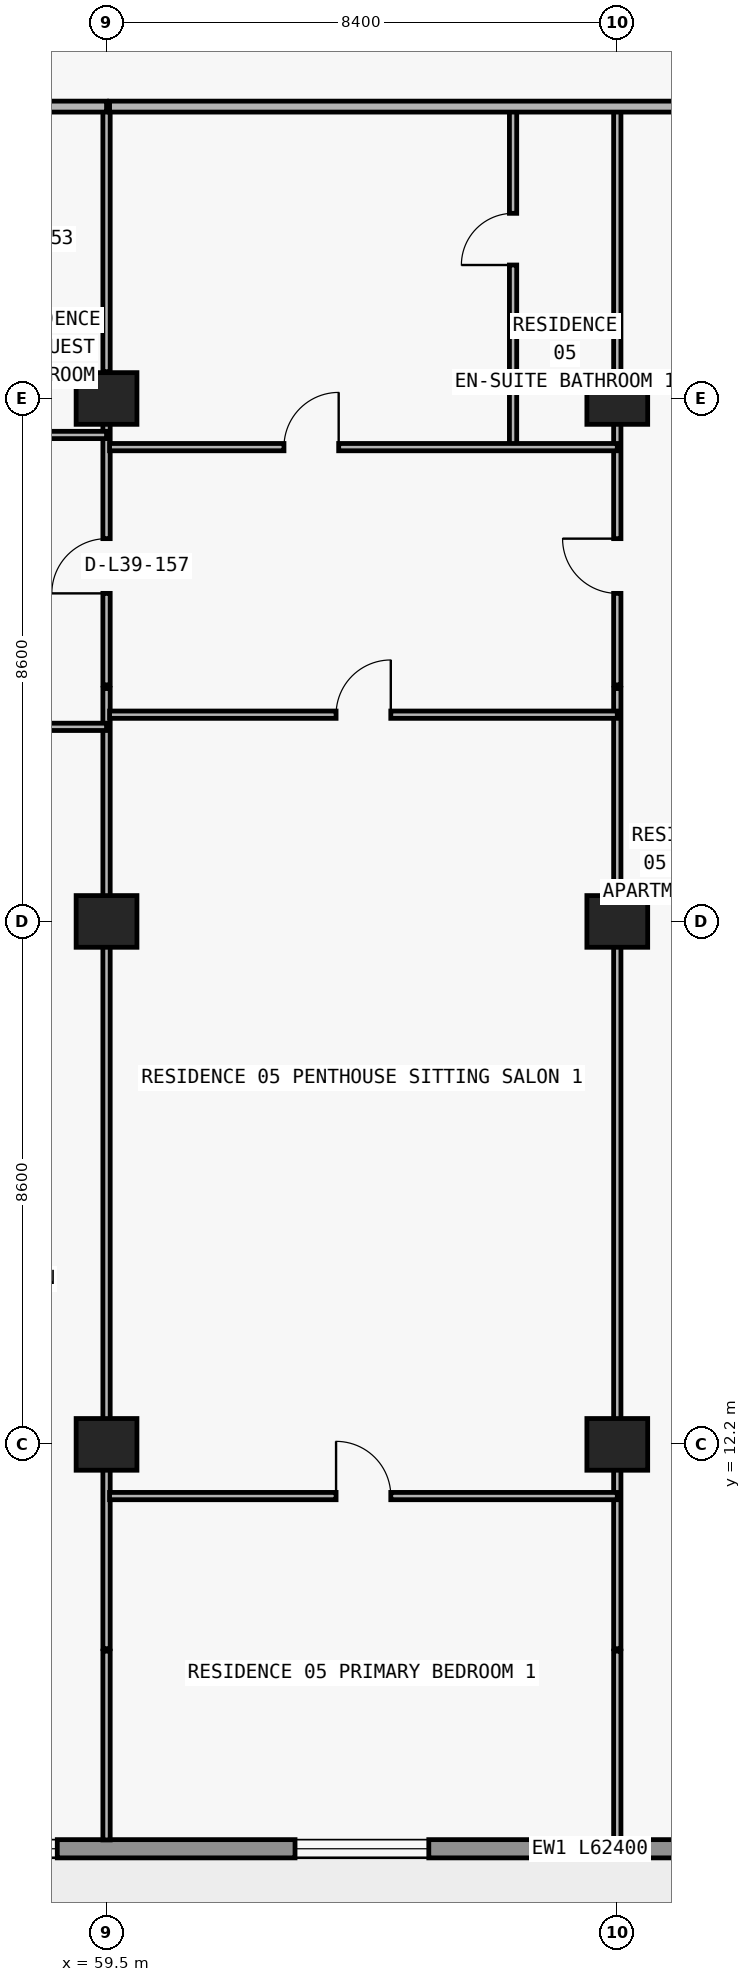
"""IFC4 building model, lengths in metres.
Left out: names, types, materials, properties, quantities, classifications, styles, units other than length and angle.
Written with IfcOpenShell. Run it as: python <this file> out.ifc"""

import sys

from ifc_helpers import new_model, si_unit, direction, frame, frame_2d, origin, origin_2d, place, context, subcontext, project, spatial, rectangle, extrude, element, fill, save


model = new_model("IFC4")
c1 = context("Model", 3, precision=1e-05, world=origin(), true_north=direction((0.0, 1.0)))
c2 = subcontext(c1, "Body", "Model", "MODEL_VIEW")
j1 = project(units=[si_unit("LENGTHUNIT", "METRE"), si_unit("PLANEANGLEUNIT", "RADIAN")], contexts=[c1])
p1 = place(None, origin())
s1 = spatial("IfcSite", under=j1, at=p1, CompositionType="ELEMENT")
p2 = place(p1, origin())
s2 = spatial("IfcBuilding", under=s1, at=p2, CompositionType="ELEMENT")
p3 = place(p2, frame((0.0, 0.0, 142.2)))
s3 = spatial("IfcBuildingStorey", under=s2, at=p3, CompositionType="ELEMENT", Elevation=142.2)
for number, where, z_axis, x_axis in (
    (1, (59.5, 12.2, 0.0), (0.0, 0.0, 1.0), (1.0, 0.0, 0.0)),
    (2, (67.9, 12.2, 0.0), (0.0, 0.0, 1.0), (1.0, 0.0, 0.0)),
    (3, (59.5, 20.8, 0.0), (0.0, 0.0, 1.0), (1.0, 0.0, 0.0)),
    (4, (67.9, 20.8, 0.0), (0.0, 0.0, 1.0), (1.0, 0.0, 0.0)),
    (5, (59.5, 29.4, 0.0), (0.0, 0.0, 1.0), (1.0, 0.0, 0.0)),
    (6, (67.9, 29.4, 0.0), (0.0, 0.0, 1.0), (1.0, 0.0, 0.0)),
):
    element("IfcColumn", number, at=place(p3, frame(where, z_axis=z_axis, x_axis=x_axis)), inside=s3, PredefinedType="COLUMN", context=c2, shape_type="SweptSolid", body=[
        extrude(rectangle(XDim=1.0, YDim=0.85, at=origin_2d()), origin(), (0.0, 0.0, 1.0), 3.05),
    ])
p4 = place(p3, frame((70.1, 5.55, 0.0), z_axis=(0.0, 0.0, 1.0), x_axis=(-1.0, 0.0, 0.0)))
e7 = element("IfcWall", 7, at=p4, inside=s3, PredefinedType="STANDARD", context=c2, shape_type="SweptSolid", body=[
    extrude(rectangle(XDim=62.4, YDim=0.3, at=frame_2d((31.2, 0.0))), origin(), (0.0, 0.0, 1.0), 3.05),
])
p5 = place(p4, frame((57.226, 0.0, 0.0)))
e8 = element("IfcOpeningElement", 8, at=p5, cuts=e7, PredefinedType="OPENING", context=c2, shape_type="SweptSolid", body=[
    extrude(rectangle(XDim=2.0, YDim=2.3, at=frame_2d((1.0, 1.15))), frame((0.0, 0.16, 0.0), z_axis=(0.0, -1.0, 0.0), x_axis=(1.0, 0.0, 0.0)), (0.0, 0.0, 1.0), 0.32),
])
p6 = place(p4, frame((52.926, 0.0, 0.85)))
e9 = element("IfcOpeningElement", 9, at=p6, cuts=e7, PredefinedType="OPENING", context=c2, shape_type="SweptSolid", body=[
    extrude(rectangle(XDim=2.2, YDim=1.55, at=frame_2d((1.1, 0.775))), frame((0.0, 0.16, 0.0), z_axis=(0.0, -1.0, 0.0), x_axis=(1.0, 0.0, 0.0)), (0.0, 0.0, 1.0), 0.32),
])
p7 = place(p4, frame((48.49, 0.0, 0.0)))
e10 = element("IfcOpeningElement", 10, at=p7, cuts=e7, PredefinedType="OPENING", context=c2, shape_type="SweptSolid", body=[
    extrude(rectangle(XDim=2.0, YDim=2.3, at=frame_2d((1.0, 1.15))), frame((0.0, 0.16, 0.0), z_axis=(0.0, -1.0, 0.0), x_axis=(1.0, 0.0, 0.0)), (0.0, 0.0, 1.0), 0.32),
])
p8 = place(p4, frame((44.39, 0.0, 0.85)))
e11 = element("IfcOpeningElement", 11, at=p8, cuts=e7, PredefinedType="OPENING", context=c2, shape_type="SweptSolid", body=[
    extrude(rectangle(XDim=1.8, YDim=1.55, at=frame_2d((0.9, 0.775))), frame((0.0, 0.16, 0.0), z_axis=(0.0, -1.0, 0.0), x_axis=(1.0, 0.0, 0.0)), (0.0, 0.0, 1.0), 0.32),
])
p9 = place(p4, frame((40.426, 0.0, 0.0)))
e12 = element("IfcOpeningElement", 12, at=p9, cuts=e7, PredefinedType="OPENING", context=c2, shape_type="SweptSolid", body=[
    extrude(rectangle(XDim=2.0, YDim=2.3, at=frame_2d((1.0, 1.15))), frame((0.0, 0.16, 0.0), z_axis=(0.0, -1.0, 0.0), x_axis=(1.0, 0.0, 0.0)), (0.0, 0.0, 1.0), 0.32),
])
p10 = place(p4, frame((36.126, 0.0, 0.85)))
e13 = element("IfcOpeningElement", 13, at=p10, cuts=e7, PredefinedType="OPENING", context=c2, shape_type="SweptSolid", body=[
    extrude(rectangle(XDim=2.2, YDim=1.55, at=frame_2d((1.1, 0.775))), frame((0.0, 0.16, 0.0), z_axis=(0.0, -1.0, 0.0), x_axis=(1.0, 0.0, 0.0)), (0.0, 0.0, 1.0), 0.32),
])
p11 = place(p4, frame((32.09, 0.0, 0.0)))
e14 = element("IfcOpeningElement", 14, at=p11, cuts=e7, PredefinedType="OPENING", context=c2, shape_type="SweptSolid", body=[
    extrude(rectangle(XDim=2.0, YDim=2.3, at=frame_2d((1.0, 1.15))), frame((0.0, 0.16, 0.0), z_axis=(0.0, -1.0, 0.0), x_axis=(1.0, 0.0, 0.0)), (0.0, 0.0, 1.0), 0.32),
])
p12 = place(p4, frame((28.21, 0.0, 0.65)))
e15 = element("IfcOpeningElement", 15, at=p12, cuts=e7, PredefinedType="OPENING", context=c2, shape_type="SweptSolid", body=[
    extrude(rectangle(XDim=2.6, YDim=1.85, at=frame_2d((1.3, 0.925))), frame((0.0, 0.16, 0.0), z_axis=(0.0, -1.0, 0.0), x_axis=(1.0, 0.0, 0.0)), (0.0, 0.0, 1.0), 0.32),
])
p13 = place(p4, frame((22.1, 0.0, 0.85)))
e16 = element("IfcOpeningElement", 16, at=p13, cuts=e7, PredefinedType="OPENING", context=c2, shape_type="SweptSolid", body=[
    extrude(rectangle(XDim=2.2, YDim=1.55, at=frame_2d((1.1, 0.775))), frame((0.0, 0.16, 0.0), z_axis=(0.0, -1.0, 0.0), x_axis=(1.0, 0.0, 0.0)), (0.0, 0.0, 1.0), 0.32),
])
p14 = place(p4, frame((16.09, 0.0, 0.0)))
e17 = element("IfcOpeningElement", 17, at=p14, cuts=e7, PredefinedType="OPENING", context=c2, shape_type="SweptSolid", body=[
    extrude(rectangle(XDim=2.0, YDim=2.3, at=frame_2d((1.0, 1.15))), frame((0.0, 0.16, 0.0), z_axis=(0.0, -1.0, 0.0), x_axis=(1.0, 0.0, 0.0)), (0.0, 0.0, 1.0), 0.32),
])
p15 = place(p4, frame((11.41, 0.0, 0.65)))
e18 = element("IfcOpeningElement", 18, at=p15, cuts=e7, PredefinedType="OPENING", context=c2, shape_type="SweptSolid", body=[
    extrude(rectangle(XDim=2.6, YDim=1.85, at=frame_2d((1.3, 0.925))), frame((0.0, 0.16, 0.0), z_axis=(0.0, -1.0, 0.0), x_axis=(1.0, 0.0, 0.0)), (0.0, 0.0, 1.0), 0.32),
])
p16 = place(p4, frame((5.3, 0.0, 0.85)))
e19 = element("IfcOpeningElement", 19, at=p16, cuts=e7, PredefinedType="OPENING", context=c2, shape_type="SweptSolid", body=[
    extrude(rectangle(XDim=2.2, YDim=1.55, at=frame_2d((1.1, 0.775))), frame((0.0, 0.16, 0.0), z_axis=(0.0, -1.0, 0.0), x_axis=(1.0, 0.0, 0.0)), (0.0, 0.0, 1.0), 0.32),
])
p17 = place(p3, frame((59.5, 5.695, 0.0), z_axis=(0.0, 0.0, 1.0), x_axis=(0.0, 1.0, 0.0)))
e20 = element("IfcWall", 20, at=p17, inside=s3, PredefinedType="PARTITIONING", context=c2, shape_type="SweptSolid", body=[
    extrude(rectangle(XDim=3.105, YDim=0.12, at=frame_2d((1.552, 0.0))), origin(), (0.0, 0.0, 1.0), 3.05),
])
p18 = place(p3, frame((59.5, 8.84, 0.0), z_axis=(0.0, 0.0, 1.0), x_axis=(0.0, 1.0, 0.0)))
e21 = element("IfcWall", 21, at=p18, inside=s3, PredefinedType="PARTITIONING", context=c2, shape_type="SweptSolid", body=[
    extrude(rectangle(XDim=15.79, YDim=0.12, at=frame_2d((7.895, 0.0))), origin(), (0.0, 0.0, 1.0), 2.174),
])
p19 = place(p3, frame((59.5, 24.69, 0.0), z_axis=(0.0, 0.0, 1.0), x_axis=(0.0, 1.0, 0.0)))
e22 = element("IfcWall", 22, at=p19, inside=s3, PredefinedType="PARTITIONING", context=c2, shape_type="SweptSolid", body=[
    extrude(rectangle(XDim=5.09, YDim=0.12, at=frame_2d((2.545, 0.0))), origin(), (0.0, 0.0, 1.0), 2.174),
])
p20 = place(p19, frame((1.505, 0.0, 0.0)))
e23 = element("IfcOpeningElement", 23, at=p20, cuts=e22, PredefinedType="OPENING", context=c2, shape_type="SweptSolid", body=[
    extrude(rectangle(XDim=0.9, YDim=2.124, at=frame_2d((0.45, 1.062))), frame((0.0, 0.07, 0.0), z_axis=(0.0, -1.0, 0.0), x_axis=(1.0, 0.0, 0.0)), (0.0, 0.0, 1.0), 0.14),
])
p21 = place(p3, frame((59.5, 29.84, 0.0), z_axis=(0.0, 0.0, 1.0), x_axis=(0.0, 1.0, 0.0)))
e24 = element("IfcWall", 24, at=p21, inside=s3, PredefinedType="PARTITIONING", context=c2, shape_type="SweptSolid", body=[
    extrude(rectangle(XDim=4.36, YDim=0.12, at=frame_2d((2.18, 0.0))), origin(), (0.0, 0.0, 1.0), 2.174),
])
p22 = place(p3, frame((66.186, 28.6, 0.0), z_axis=(0.0, 0.0, 1.0), x_axis=(0.0, 1.0, 0.0)))
e25 = element("IfcWall", 25, at=p22, inside=s3, PredefinedType="PARTITIONING", context=c2, shape_type="SweptSolid", body=[
    extrude(rectangle(XDim=1.18, YDim=0.12, at=frame_2d((0.59, 0.0))), origin(), (0.0, 0.0, 1.0), 3.05),
])
p23 = place(p3, frame((66.186, 29.84, 0.0), z_axis=(0.0, 0.0, 1.0), x_axis=(0.0, 1.0, 0.0)))
e26 = element("IfcWall", 26, at=p23, inside=s3, PredefinedType="PARTITIONING", context=c2, shape_type="SweptSolid", body=[
    extrude(rectangle(XDim=4.36, YDim=0.12, at=frame_2d((2.18, 0.0))), origin(), (0.0, 0.0, 1.0), 3.05),
])
p24 = place(p23, frame((1.755, 0.0, 0.0)))
e27 = element("IfcOpeningElement", 27, at=p24, cuts=e26, PredefinedType="OPENING", context=c2, shape_type="SweptSolid", body=[
    extrude(rectangle(XDim=0.85, YDim=2.1, at=frame_2d((0.425, 1.05))), frame((0.0, 0.07, 0.0), z_axis=(0.0, -1.0, 0.0), x_axis=(1.0, 0.0, 0.0)), (0.0, 0.0, 1.0), 0.14),
])
p25 = place(p3, frame((67.9, 5.695, 0.0), z_axis=(0.0, 0.0, 1.0), x_axis=(0.0, 1.0, 0.0)))
e28 = element("IfcWall", 28, at=p25, inside=s3, PredefinedType="PARTITIONING", context=c2, shape_type="SweptSolid", body=[
    extrude(rectangle(XDim=3.105, YDim=0.12, at=frame_2d((1.552, 0.0))), origin(), (0.0, 0.0, 1.0), 3.05),
])
p26 = place(p3, frame((67.9, 8.84, 0.0), z_axis=(0.0, 0.0, 1.0), x_axis=(0.0, 1.0, 0.0)))
e29 = element("IfcWall", 29, at=p26, inside=s3, PredefinedType="PARTITIONING", context=c2, shape_type="SweptSolid", body=[
    extrude(rectangle(XDim=15.79, YDim=0.12, at=frame_2d((7.895, 0.0))), origin(), (0.0, 0.0, 1.0), 2.174),
])
p27 = place(p3, frame((67.9, 24.69, 0.0), z_axis=(0.0, 0.0, 1.0), x_axis=(0.0, 1.0, 0.0)))
e30 = element("IfcWall", 30, at=p27, inside=s3, PredefinedType="PARTITIONING", context=c2, shape_type="SweptSolid", body=[
    extrude(rectangle(XDim=5.09, YDim=0.12, at=frame_2d((2.545, 0.0))), origin(), (0.0, 0.0, 1.0), 2.174),
])
p28 = place(p27, frame((1.505, 0.0, 0.0)))
e31 = element("IfcOpeningElement", 31, at=p28, cuts=e30, PredefinedType="OPENING", context=c2, shape_type="SweptSolid", body=[
    extrude(rectangle(XDim=0.9, YDim=2.124, at=frame_2d((0.45, 1.062))), frame((0.0, 0.07, 0.0), z_axis=(0.0, -1.0, 0.0), x_axis=(1.0, 0.0, 0.0)), (0.0, 0.0, 1.0), 0.14),
])
p29 = place(p3, frame((67.9, 29.84, 0.0), z_axis=(0.0, 0.0, 1.0), x_axis=(0.0, 1.0, 0.0)))
e32 = element("IfcWall", 32, at=p29, inside=s3, PredefinedType="PARTITIONING", context=c2, shape_type="SweptSolid", body=[
    extrude(rectangle(XDim=4.36, YDim=0.12, at=frame_2d((2.18, 0.0))), origin(), (0.0, 0.0, 1.0), 2.174),
])
p30 = place(p3, frame((59.55, 11.35, 0.0), z_axis=(0.0, 0.0, 1.0), x_axis=(1.0, 0.0, 0.0)))
e33 = element("IfcWall", 33, at=p30, inside=s3, PredefinedType="PARTITIONING", context=c2, shape_type="SweptSolid", body=[
    extrude(rectangle(XDim=8.35, YDim=0.12, at=frame_2d((4.175, 0.0))), origin(), (0.0, 0.0, 1.0), 3.05),
])
p31 = place(p30, frame((3.725, 0.0, 0.0)))
e34 = element("IfcOpeningElement", 34, at=p31, cuts=e33, PredefinedType="OPENING", context=c2, shape_type="SweptSolid", body=[
    extrude(rectangle(XDim=0.9, YDim=2.15, at=frame_2d((0.45, 1.075))), frame((0.0, 0.07, 0.0), z_axis=(0.0, -1.0, 0.0), x_axis=(1.0, 0.0, 0.0)), (0.0, 0.0, 1.0), 0.14),
])
p32 = place(p3, frame((51.32, 24.0, 0.0), z_axis=(0.0, 0.0, 1.0), x_axis=(1.0, 0.0, 0.0)))
e35 = element("IfcWall", 35, at=p32, inside=s3, PredefinedType="PARTITIONING", context=c2, shape_type="SweptSolid", body=[
    extrude(rectangle(XDim=8.18, YDim=0.12, at=frame_2d((4.09, 0.0))), origin(), (0.0, 0.0, 1.0), 3.05),
])
p33 = place(p32, frame((1.33, 0.0, 0.0)))
e36 = element("IfcOpeningElement", 36, at=p33, cuts=e35, PredefinedType="OPENING", context=c2, shape_type="SweptSolid", body=[
    extrude(rectangle(XDim=0.9, YDim=2.15, at=frame_2d((0.45, 1.075))), frame((0.0, 0.07, 0.0), z_axis=(0.0, -1.0, 0.0), x_axis=(1.0, 0.0, 0.0)), (0.0, 0.0, 1.0), 0.14),
])
p34 = place(p3, frame((59.55, 24.2, 0.0), z_axis=(0.0, 0.0, 1.0), x_axis=(1.0, 0.0, 0.0)))
e37 = element("IfcWall", 37, at=p34, inside=s3, PredefinedType="PARTITIONING", context=c2, shape_type="SweptSolid", body=[
    extrude(rectangle(XDim=8.35, YDim=0.12, at=frame_2d((4.175, 0.0))), origin(), (0.0, 0.0, 1.0), 3.05),
])
p35 = place(p34, frame((3.725, 0.0, 0.0)))
e38 = element("IfcOpeningElement", 38, at=p35, cuts=e37, PredefinedType="OPENING", context=c2, shape_type="SweptSolid", body=[
    extrude(rectangle(XDim=0.9, YDim=2.15, at=frame_2d((0.45, 1.075))), frame((0.0, 0.07, 0.0), z_axis=(0.0, -1.0, 0.0), x_axis=(1.0, 0.0, 0.0)), (0.0, 0.0, 1.0), 0.14),
])
p36 = place(p3, frame((59.55, 28.6, 0.0), z_axis=(0.0, 0.0, 1.0), x_axis=(1.0, 0.0, 0.0)))
e39 = element("IfcWall", 39, at=p36, inside=s3, PredefinedType="PARTITIONING", context=c2, shape_type="SweptSolid", body=[
    extrude(rectangle(XDim=8.35, YDim=0.12, at=frame_2d((4.175, 0.0))), origin(), (0.0, 0.0, 1.0), 3.05),
])
p37 = place(p36, frame((2.868, 0.0, 0.0)))
e40 = element("IfcOpeningElement", 40, at=p37, cuts=e39, PredefinedType="OPENING", context=c2, shape_type="SweptSolid", body=[
    extrude(rectangle(XDim=0.9, YDim=2.15, at=frame_2d((0.45, 1.075))), frame((0.0, 0.07, 0.0), z_axis=(0.0, -1.0, 0.0), x_axis=(1.0, 0.0, 0.0)), (0.0, 0.0, 1.0), 0.14),
])
p38 = place(p3, frame((51.32, 28.8, 0.0), z_axis=(0.0, 0.0, 1.0), x_axis=(1.0, 0.0, 0.0)))
e41 = element("IfcWall", 41, at=p38, inside=s3, PredefinedType="PARTITIONING", context=c2, shape_type="SweptSolid", body=[
    extrude(rectangle(XDim=8.18, YDim=0.12, at=frame_2d((4.09, 0.0))), origin(), (0.0, 0.0, 1.0), 3.05),
])
p39 = place(p38, frame((1.33, 0.0, 0.0)))
e42 = element("IfcOpeningElement", 42, at=p39, cuts=e41, PredefinedType="OPENING", context=c2, shape_type="SweptSolid", body=[
    extrude(rectangle(XDim=0.9, YDim=2.15, at=frame_2d((0.45, 1.075))), frame((0.0, 0.07, 0.0), z_axis=(0.0, -1.0, 0.0), x_axis=(1.0, 0.0, 0.0)), (0.0, 0.0, 1.0), 0.14),
])
p40 = place(p3, frame((18.3, 34.2, 0.0), z_axis=(0.0, 0.0, 1.0), x_axis=(1.0, 0.0, 0.0)))
e43 = element("IfcWall", 43, at=p40, inside=s3, PredefinedType="PARTITIONING", context=c2, shape_type="SweptSolid", body=[
    extrude(rectangle(XDim=41.2, YDim=0.18, at=frame_2d((20.6, 0.0))), origin(), (0.0, 0.0, 1.0), 3.05),
])
p41 = place(p40, frame((2.683, 0.0, 0.0)))
e44 = element("IfcOpeningElement", 44, at=p41, cuts=e43, PredefinedType="OPENING", context=c2, shape_type="SweptSolid", body=[
    extrude(rectangle(XDim=1.0, YDim=2.2, at=frame_2d((0.5, 1.1))), frame((0.0, 0.1, 0.0), z_axis=(0.0, -1.0, 0.0), x_axis=(1.0, 0.0, 0.0)), (0.0, 0.0, 1.0), 0.2),
])
p42 = place(p40, frame((10.919, 0.0, 0.0)))
e45 = element("IfcOpeningElement", 45, at=p42, cuts=e43, PredefinedType="OPENING", context=c2, shape_type="SweptSolid", body=[
    extrude(rectangle(XDim=1.0, YDim=2.2, at=frame_2d((0.5, 1.1))), frame((0.0, 0.1, 0.0), z_axis=(0.0, -1.0, 0.0), x_axis=(1.0, 0.0, 0.0)), (0.0, 0.0, 1.0), 0.2),
])
p43 = place(p40, frame((19.192, 0.0, 0.0)))
e46 = element("IfcOpeningElement", 46, at=p43, cuts=e43, PredefinedType="OPENING", context=c2, shape_type="SweptSolid", body=[
    extrude(rectangle(XDim=1.0, YDim=2.2, at=frame_2d((0.5, 1.1))), frame((0.0, 0.1, 0.0), z_axis=(0.0, -1.0, 0.0), x_axis=(1.0, 0.0, 0.0)), (0.0, 0.0, 1.0), 0.2),
])
p44 = place(p40, frame((35.546, 0.0, 0.0)))
e47 = element("IfcOpeningElement", 47, at=p44, cuts=e43, PredefinedType="OPENING", context=c2, shape_type="SweptSolid", body=[
    extrude(rectangle(XDim=1.0, YDim=2.2, at=frame_2d((0.5, 1.1))), frame((0.0, 0.1, 0.0), z_axis=(0.0, -1.0, 0.0), x_axis=(1.0, 0.0, 0.0)), (0.0, 0.0, 1.0), 0.2),
])
p45 = place(p3, frame((59.55, 34.2, 0.0), z_axis=(0.0, 0.0, 1.0), x_axis=(1.0, 0.0, 0.0)))
e48 = element("IfcWall", 48, at=p45, inside=s3, PredefinedType="PARTITIONING", context=c2, shape_type="SweptSolid", body=[
    extrude(rectangle(XDim=10.55, YDim=0.18, at=frame_2d((5.275, 0.0))), origin(), (0.0, 0.0, 1.0), 3.05),
])
p46 = place(p15, origin())
e49 = element("IfcWindow", 49, at=p46, inside=s3, PartitioningType="SINGLE_PANEL", PredefinedType="WINDOW", context=c2, shape_type="SweptSolid", body=[
    extrude(rectangle(XDim=2.6, YDim=1.85, at=frame_2d((1.3, 0.925))), frame((0.0, 0.03, 0.0), z_axis=(0.0, -1.0, 0.0), x_axis=(1.0, 0.0, 0.0)), (0.0, 0.0, 1.0), 0.06),
])
fill(e18, e49)
p47 = place(p16, origin())
e50 = element("IfcWindow", 50, at=p47, inside=s3, PartitioningType="SINGLE_PANEL", PredefinedType="WINDOW", context=c2, shape_type="SweptSolid", body=[
    extrude(rectangle(XDim=2.2, YDim=1.55, at=frame_2d((1.1, 0.775))), frame((0.0, 0.03, 0.0), z_axis=(0.0, -1.0, 0.0), x_axis=(1.0, 0.0, 0.0)), (0.0, 0.0, 1.0), 0.06),
])
fill(e19, e50)
p48 = place(p20, origin())
e51 = element("IfcDoor", 51, at=p48, inside=s3, OperationType="SINGLE_SWING_LEFT", PredefinedType="DOOR", context=c2, shape_type="SweptSolid", body=[
    extrude(rectangle(XDim=0.9, YDim=2.124, at=frame_2d((0.45, 1.062))), frame((0.0, 0.025, 0.0), z_axis=(0.0, -1.0, 0.0), x_axis=(1.0, 0.0, 0.0)), (0.0, 0.0, 1.0), 0.05),
])
fill(e23, e51)
p49 = place(p37, origin())
e52 = element("IfcDoor", 52, at=p49, inside=s3, OperationType="SINGLE_SWING_RIGHT", PredefinedType="DOOR", context=c2, shape_type="SweptSolid", body=[
    extrude(rectangle(XDim=0.9, YDim=2.15, at=frame_2d((0.45, 1.075))), frame((0.0, 0.025, 0.0), z_axis=(0.0, -1.0, 0.0), x_axis=(1.0, 0.0, 0.0)), (0.0, 0.0, 1.0), 0.05),
])
fill(e40, e52)
p50 = place(p24, origin())
e53 = element("IfcDoor", 53, at=p50, inside=s3, OperationType="SINGLE_SWING_LEFT", PredefinedType="DOOR", context=c2, shape_type="SweptSolid", body=[
    extrude(rectangle(XDim=0.85, YDim=2.1, at=frame_2d((0.425, 1.05))), frame((0.0, 0.025, 0.0), z_axis=(0.0, -1.0, 0.0), x_axis=(1.0, 0.0, 0.0)), (0.0, 0.0, 1.0), 0.05),
])
fill(e27, e53)
p51 = place(p35, origin())
e54 = element("IfcDoor", 54, at=p51, inside=s3, OperationType="SINGLE_SWING_RIGHT", PredefinedType="DOOR", context=c2, shape_type="SweptSolid", body=[
    extrude(rectangle(XDim=0.9, YDim=2.15, at=frame_2d((0.45, 1.075))), frame((0.0, 0.025, 0.0), z_axis=(0.0, -1.0, 0.0), x_axis=(1.0, 0.0, 0.0)), (0.0, 0.0, 1.0), 0.05),
])
fill(e38, e54)
p52 = place(p31, origin())
e55 = element("IfcDoor", 55, at=p52, inside=s3, OperationType="SINGLE_SWING_LEFT", PredefinedType="DOOR", context=c2, shape_type="SweptSolid", body=[
    extrude(rectangle(XDim=0.9, YDim=2.15, at=frame_2d((0.45, 1.075))), frame((0.0, 0.025, 0.0), z_axis=(0.0, -1.0, 0.0), x_axis=(1.0, 0.0, 0.0)), (0.0, 0.0, 1.0), 0.05),
])
fill(e34, e55)
p53 = place(p28, origin())
e56 = element("IfcDoor", 56, at=p53, inside=s3, OperationType="SINGLE_SWING_RIGHT", PredefinedType="DOOR", context=c2, shape_type="SweptSolid", body=[
    extrude(rectangle(XDim=0.9, YDim=2.124, at=frame_2d((0.45, 1.062))), frame((0.0, 0.025, 0.0), z_axis=(0.0, -1.0, 0.0), x_axis=(1.0, 0.0, 0.0)), (0.0, 0.0, 1.0), 0.05),
])
fill(e31, e56)
save(model, sys.argv[1])
